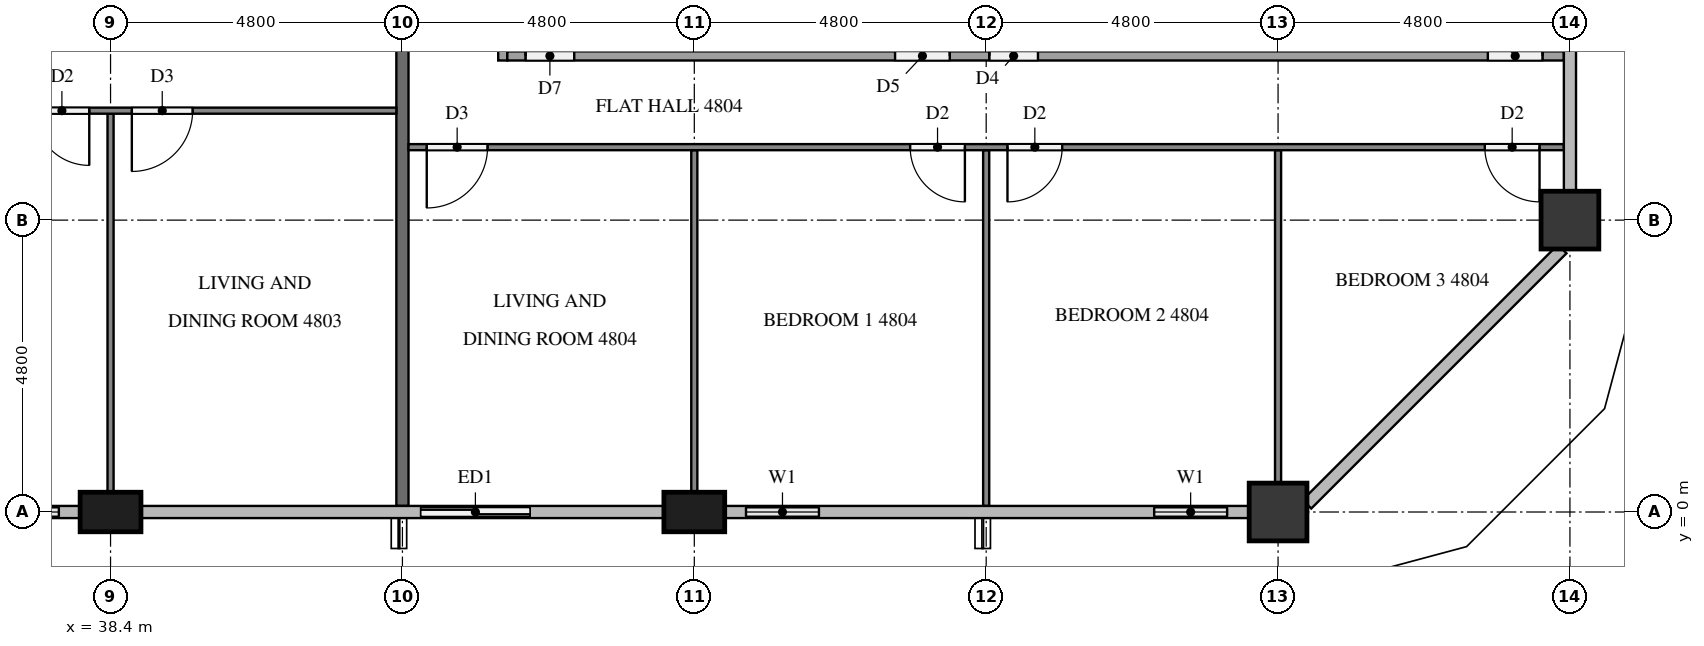
"""IFC4 building model, lengths in metres.
Left out: names, types, materials, properties, quantities, classifications, styles, units other than length and angle.
Written with IfcOpenShell. Run it as: python <this file> out.ifc"""

import sys

from ifc_helpers import new_model, si_unit, direction, frame, frame_2d, origin, origin_2d, place, context, subcontext, project, spatial, rectangle, extrude, element, fill, save


model = new_model("IFC4")
c1 = context("Model", 3, precision=1e-05, world=origin(), true_north=direction((0.0, 1.0)))
c2 = subcontext(c1, "Body", "Model", "MODEL_VIEW")
j1 = project(units=[si_unit("LENGTHUNIT", "METRE"), si_unit("PLANEANGLEUNIT", "RADIAN")], contexts=[c1])
p1 = place(None, origin())
s1 = spatial("IfcSite", under=j1, at=p1, CompositionType="ELEMENT")
p2 = place(p1, origin())
s2 = spatial("IfcBuilding", under=s1, at=p2, CompositionType="ELEMENT")
p3 = place(p2, frame((0.0, 0.0, 185.9)))
s3 = spatial("IfcBuildingStorey", under=s2, at=p3, CompositionType="ELEMENT", Elevation=185.9)
for number, where, z_axis, x_axis in (
    (1, (38.4, 0.0, 0.0), (0.0, 0.0, 1.0), (1.0, 0.0, 0.0)),
    (2, (48.0, 0.0, 0.0), (0.0, 0.0, 1.0), (1.0, 0.0, 0.0)),
):
    element("IfcColumn", number, at=place(p3, frame(where, z_axis=z_axis, x_axis=x_axis)), inside=s3, PredefinedType="COLUMN", context=c2, shape_type="SweptSolid", body=[
        extrude(rectangle(XDim=1.0, YDim=0.65, at=origin_2d()), origin(), (0.0, 0.0, 1.0), 3.2),
    ])
for number, where, z_axis, x_axis in (
    (3, (57.6, 0.0, 0.0), (0.0, 0.0, 1.0), (1.0, 0.0, 0.0)),
    (4, (62.4, 4.8, 0.0), (0.0, 0.0, 1.0), (1.0, 0.0, 0.0)),
):
    element("IfcColumn", number, at=place(p3, frame(where, z_axis=z_axis, x_axis=x_axis)), inside=s3, PredefinedType="COLUMN", context=c2, shape_type="SweptSolid", body=[
        extrude(rectangle(XDim=0.95, YDim=0.95, at=origin_2d()), origin(), (0.0, 0.0, 1.0), 3.2),
    ])
p4 = place(p3, frame((36.0, 0.0, 0.0), z_axis=(0.0, 0.0, 1.0), x_axis=(1.0, 0.0, 0.0)))
e5 = element("IfcWall", 5, at=p4, inside=s3, PredefinedType="SOLIDWALL", context=c2, shape_type="SweptSolid", body=[
    extrude(rectangle(XDim=1.9, YDim=0.15, at=frame_2d((0.95, 0.0))), origin(), (0.0, 0.0, 1.0), 3.2),
])
p5 = place(p4, frame((0.35, 0.0, 0.9)))
e6 = element("IfcOpeningElement", 6, at=p5, cuts=e5, PredefinedType="OPENING", context=c2, shape_type="SweptSolid", body=[
    extrude(rectangle(XDim=1.2, YDim=1.4, at=frame_2d((0.6, 0.7))), frame((0.0, 0.085, 0.0), z_axis=(0.0, -1.0, 0.0), x_axis=(1.0, 0.0, 0.0)), (0.0, 0.0, 1.0), 0.17),
])
p6 = place(p3, frame((43.2, 0.0, 0.0), z_axis=(0.0, 0.0, 1.0), x_axis=(1.0, 0.0, 0.0)))
e7 = element("IfcWall", 7, at=p6, inside=s3, PredefinedType="SOLIDWALL", context=c2, shape_type="SweptSolid", body=[
    extrude(rectangle(XDim=2.4, YDim=0.15, at=frame_2d((1.2, 0.0))), origin(), (0.0, 0.0, 1.0), 3.2),
])
p7 = place(p6, frame((0.3, 0.0, 0.0)))
e8 = element("IfcOpeningElement", 8, at=p7, cuts=e7, PredefinedType="OPENING", context=c2, shape_type="SweptSolid", body=[
    extrude(rectangle(XDim=1.8, YDim=2.4, at=frame_2d((0.9, 1.2))), frame((0.0, 0.085, 0.0), z_axis=(0.0, -1.0, 0.0), x_axis=(1.0, 0.0, 0.0)), (0.0, 0.0, 1.0), 0.17),
])
p8 = place(p3, frame((48.5, 0.0, 0.0), z_axis=(0.0, 0.0, 1.0), x_axis=(1.0, 0.0, 0.0)))
e9 = element("IfcWall", 9, at=p8, inside=s3, PredefinedType="SOLIDWALL", context=c2, shape_type="SweptSolid", body=[
    extrude(rectangle(XDim=1.9, YDim=0.15, at=frame_2d((0.95, 0.0))), origin(), (0.0, 0.0, 1.0), 3.2),
])
p9 = place(p8, frame((0.35, 0.0, 0.9)))
e10 = element("IfcOpeningElement", 10, at=p9, cuts=e9, PredefinedType="OPENING", context=c2, shape_type="SweptSolid", body=[
    extrude(rectangle(XDim=1.2, YDim=1.4, at=frame_2d((0.6, 0.7))), frame((0.0, 0.085, 0.0), z_axis=(0.0, -1.0, 0.0), x_axis=(1.0, 0.0, 0.0)), (0.0, 0.0, 1.0), 0.17),
])
p10 = place(p3, frame((55.2, 0.0, 0.0), z_axis=(0.0, 0.0, 1.0), x_axis=(1.0, 0.0, 0.0)))
e11 = element("IfcWall", 11, at=p10, inside=s3, PredefinedType="SOLIDWALL", context=c2, shape_type="SweptSolid", body=[
    extrude(rectangle(XDim=1.925, YDim=0.15, at=frame_2d((0.962, 0.0))), origin(), (0.0, 0.0, 1.0), 3.2),
])
p11 = place(p10, frame((0.363, 0.0, 0.9)))
e12 = element("IfcOpeningElement", 12, at=p11, cuts=e11, PredefinedType="OPENING", context=c2, shape_type="SweptSolid", body=[
    extrude(rectangle(XDim=1.2, YDim=1.4, at=frame_2d((0.6, 0.7))), frame((0.0, 0.085, 0.0), z_axis=(0.0, -1.0, 0.0), x_axis=(1.0, 0.0, 0.0)), (0.0, 0.0, 1.0), 0.17),
])
p12 = place(p3, frame((43.2, 11.9, 0.0), z_axis=(0.0, 0.0, 1.0), x_axis=(0.0, -1.0, 0.0)))
e13 = element("IfcWall", 13, at=p12, inside=s3, PredefinedType="PARTITIONING", context=c2, shape_type="SweptSolid", body=[
    extrude(rectangle(XDim=11.8, YDim=0.2, at=frame_2d((5.9, 0.0))), origin(), (0.0, 0.0, 1.0), 3.2),
])
p13 = place(p3, frame((38.4, 6.55, 0.0), z_axis=(0.0, 0.0, 1.0), x_axis=(0.0, -1.0, 0.0)))
e14 = element("IfcWall", 14, at=p13, inside=s3, PredefinedType="PARTITIONING", context=c2, shape_type="SweptSolid", body=[
    extrude(rectangle(XDim=6.225, YDim=0.1, at=frame_2d((3.113, 0.0))), origin(), (0.0, 0.0, 1.0), 3.2),
])
p14 = place(p3, frame((43.1, 6.6, 0.0), z_axis=(0.0, 0.0, 1.0), x_axis=(-1.0, 0.0, 0.0)))
e15 = element("IfcWall", 15, at=p14, inside=s3, PredefinedType="PARTITIONING", context=c2, shape_type="SweptSolid", body=[
    extrude(rectangle(XDim=9.4, YDim=0.1, at=frame_2d((4.7, 0.0))), origin(), (0.0, 0.0, 1.0), 3.2),
])
p15 = place(p14, frame((3.35, 0.0, 0.0)))
e16 = element("IfcOpeningElement", 16, at=p15, cuts=e15, PredefinedType="OPENING", context=c2, shape_type="SweptSolid", body=[
    extrude(rectangle(XDim=1.0, YDim=2.1, at=frame_2d((0.5, 1.05))), frame((0.0, 0.06, 0.0), z_axis=(0.0, -1.0, 0.0), x_axis=(1.0, 0.0, 0.0)), (0.0, 0.0, 1.0), 0.12),
])
p16 = place(p14, frame((5.05, 0.0, 0.0)))
e17 = element("IfcOpeningElement", 17, at=p16, cuts=e15, PredefinedType="OPENING", context=c2, shape_type="SweptSolid", body=[
    extrude(rectangle(XDim=0.9, YDim=2.1, at=frame_2d((0.45, 1.05))), frame((0.0, 0.06, 0.0), z_axis=(0.0, -1.0, 0.0), x_axis=(1.0, 0.0, 0.0)), (0.0, 0.0, 1.0), 0.12),
])
p17 = place(p3, frame((48.0, 5.95, 0.0), z_axis=(0.0, 0.0, 1.0), x_axis=(0.0, -1.0, 0.0)))
e18 = element("IfcWall", 18, at=p17, inside=s3, PredefinedType="PARTITIONING", context=c2, shape_type="SweptSolid", body=[
    extrude(rectangle(XDim=5.625, YDim=0.1, at=frame_2d((2.812, 0.0))), origin(), (0.0, 0.0, 1.0), 3.2),
])
p18 = place(p3, frame((52.8, 5.95, 0.0), z_axis=(0.0, 0.0, 1.0), x_axis=(0.0, -1.0, 0.0)))
e19 = element("IfcWall", 19, at=p18, inside=s3, PredefinedType="PARTITIONING", context=c2, shape_type="SweptSolid", body=[
    extrude(rectangle(XDim=5.85, YDim=0.1, at=frame_2d((2.925, 0.0))), origin(), (0.0, 0.0, 1.0), 3.2),
])
p19 = place(p3, frame((57.6, 5.95, 0.0), z_axis=(0.0, 0.0, 1.0), x_axis=(0.0, -1.0, 0.0)))
e20 = element("IfcWall", 20, at=p19, inside=s3, PredefinedType="PARTITIONING", context=c2, shape_type="SweptSolid", body=[
    extrude(rectangle(XDim=5.475, YDim=0.1, at=frame_2d((2.737, 0.0))), origin(), (0.0, 0.0, 1.0), 3.2),
])
p20 = place(p3, frame((62.3, 6.0, 0.0), z_axis=(0.0, 0.0, 1.0), x_axis=(-1.0, 0.0, 0.0)))
e21 = element("IfcWall", 21, at=p20, inside=s3, PredefinedType="PARTITIONING", context=c2, shape_type="SweptSolid", body=[
    extrude(rectangle(XDim=19.0, YDim=0.1, at=frame_2d((9.5, 0.0))), origin(), (0.0, 0.0, 1.0), 3.2),
])
p21 = place(p20, frame((17.7, 0.0, 0.0)))
e22 = element("IfcOpeningElement", 22, at=p21, cuts=e21, PredefinedType="OPENING", context=c2, shape_type="SweptSolid", body=[
    extrude(rectangle(XDim=1.0, YDim=2.1, at=frame_2d((0.5, 1.05))), frame((0.0, 0.06, 0.0), z_axis=(0.0, -1.0, 0.0), x_axis=(1.0, 0.0, 0.0)), (0.0, 0.0, 1.0), 0.12),
])
p22 = place(p20, frame((9.85, 0.0, 0.0)))
e23 = element("IfcOpeningElement", 23, at=p22, cuts=e21, PredefinedType="OPENING", context=c2, shape_type="SweptSolid", body=[
    extrude(rectangle(XDim=0.9, YDim=2.1, at=frame_2d((0.45, 1.05))), frame((0.0, 0.06, 0.0), z_axis=(0.0, -1.0, 0.0), x_axis=(1.0, 0.0, 0.0)), (0.0, 0.0, 1.0), 0.12),
])
p23 = place(p20, frame((8.25, 0.0, 0.0)))
e24 = element("IfcOpeningElement", 24, at=p23, cuts=e21, PredefinedType="OPENING", context=c2, shape_type="SweptSolid", body=[
    extrude(rectangle(XDim=0.9, YDim=2.1, at=frame_2d((0.45, 1.05))), frame((0.0, 0.06, 0.0), z_axis=(0.0, -1.0, 0.0), x_axis=(1.0, 0.0, 0.0)), (0.0, 0.0, 1.0), 0.12),
])
p24 = place(p20, frame((0.4, 0.0, 0.0)))
e25 = element("IfcOpeningElement", 25, at=p24, cuts=e21, PredefinedType="OPENING", context=c2, shape_type="SweptSolid", body=[
    extrude(rectangle(XDim=0.9, YDim=2.1, at=frame_2d((0.45, 1.05))), frame((0.0, 0.06, 0.0), z_axis=(0.0, -1.0, 0.0), x_axis=(1.0, 0.0, 0.0)), (0.0, 0.0, 1.0), 0.12),
])
p25 = place(p3, frame((44.85, 11.9, 0.0), z_axis=(0.0, 0.0, 1.0), x_axis=(0.0, -1.0, 0.0)))
e26 = element("IfcWall", 26, at=p25, inside=s3, PredefinedType="PARTITIONING", context=c2, shape_type="SweptSolid", body=[
    extrude(rectangle(XDim=4.475, YDim=0.15, at=frame_2d((2.237, 0.0))), origin(), (0.0, 0.0, 1.0), 3.2),
])
p26 = place(p3, frame((44.925, 7.5, 0.0), z_axis=(0.0, 0.0, 1.0), x_axis=(1.0, 0.0, 0.0)))
e27 = element("IfcWall", 27, at=p26, inside=s3, PredefinedType="PARTITIONING", context=c2, shape_type="SweptSolid", body=[
    extrude(rectangle(XDim=17.375, YDim=0.15, at=frame_2d((8.688, 0.0))), origin(), (0.0, 0.0, 1.0), 3.2),
])
p27 = place(p26, frame((0.3, 0.0, 0.0)))
e28 = element("IfcOpeningElement", 28, at=p27, cuts=e27, PredefinedType="OPENING", context=c2, shape_type="SweptSolid", body=[
    extrude(rectangle(XDim=0.8, YDim=2.1, at=frame_2d((0.4, 1.05))), frame((0.0, 0.085, 0.0), z_axis=(0.0, -1.0, 0.0), x_axis=(1.0, 0.0, 0.0)), (0.0, 0.0, 1.0), 0.17),
])
p28 = place(p26, frame((6.377, 0.0, 0.0)))
e29 = element("IfcOpeningElement", 29, at=p28, cuts=e27, PredefinedType="OPENING", context=c2, shape_type="SweptSolid", body=[
    extrude(rectangle(XDim=0.9, YDim=2.1, at=frame_2d((0.45, 1.05))), frame((0.0, 0.085, 0.0), z_axis=(0.0, -1.0, 0.0), x_axis=(1.0, 0.0, 0.0)), (0.0, 0.0, 1.0), 0.17),
])
p29 = place(p26, frame((7.927, 0.0, 0.0)))
e30 = element("IfcOpeningElement", 30, at=p29, cuts=e27, PredefinedType="OPENING", context=c2, shape_type="SweptSolid", body=[
    extrude(rectangle(XDim=0.8, YDim=2.1, at=frame_2d((0.4, 1.05))), frame((0.0, 0.085, 0.0), z_axis=(0.0, -1.0, 0.0), x_axis=(1.0, 0.0, 0.0)), (0.0, 0.0, 1.0), 0.17),
])
p30 = place(p26, frame((16.125, 0.0, 0.0)))
e31 = element("IfcOpeningElement", 31, at=p30, cuts=e27, PredefinedType="OPENING", context=c2, shape_type="SweptSolid", body=[
    extrude(rectangle(XDim=0.9, YDim=2.1, at=frame_2d((0.45, 1.05))), frame((0.0, 0.085, 0.0), z_axis=(0.0, -1.0, 0.0), x_axis=(1.0, 0.0, 0.0)), (0.0, 0.0, 1.0), 0.17),
])
p31 = place(p5, origin())
e32 = element("IfcWindow", 32, at=p31, inside=s3, PartitioningType="SINGLE_PANEL", PredefinedType="WINDOW", context=c2, shape_type="SweptSolid", body=[
    extrude(rectangle(XDim=1.2, YDim=1.4, at=frame_2d((0.6, 0.7))), frame((0.0, 0.03, 0.0), z_axis=(0.0, -1.0, 0.0), x_axis=(1.0, 0.0, 0.0)), (0.0, 0.0, 1.0), 0.06),
])
fill(e6, e32)
p32 = place(p7, origin())
e33 = element("IfcDoor", 33, at=p32, inside=s3, OperationType="SLIDING_TO_LEFT", PredefinedType="DOOR", context=c2, shape_type="SweptSolid", body=[
    extrude(rectangle(XDim=1.8, YDim=2.4, at=frame_2d((0.9, 1.2))), frame((0.0, 0.025, 0.0), z_axis=(0.0, -1.0, 0.0), x_axis=(1.0, 0.0, 0.0)), (0.0, 0.0, 1.0), 0.05),
])
fill(e8, e33)
p33 = place(p9, origin())
e34 = element("IfcWindow", 34, at=p33, inside=s3, PartitioningType="SINGLE_PANEL", PredefinedType="WINDOW", context=c2, shape_type="SweptSolid", body=[
    extrude(rectangle(XDim=1.2, YDim=1.4, at=frame_2d((0.6, 0.7))), frame((0.0, 0.03, 0.0), z_axis=(0.0, -1.0, 0.0), x_axis=(1.0, 0.0, 0.0)), (0.0, 0.0, 1.0), 0.06),
])
fill(e10, e34)
p34 = place(p11, origin())
e35 = element("IfcWindow", 35, at=p34, inside=s3, PartitioningType="SINGLE_PANEL", PredefinedType="WINDOW", context=c2, shape_type="SweptSolid", body=[
    extrude(rectangle(XDim=1.2, YDim=1.4, at=frame_2d((0.6, 0.7))), frame((0.0, 0.03, 0.0), z_axis=(0.0, -1.0, 0.0), x_axis=(1.0, 0.0, 0.0)), (0.0, 0.0, 1.0), 0.06),
])
fill(e12, e35)
p35 = place(p15, origin())
e36 = element("IfcDoor", 36, at=p35, inside=s3, OperationType="SINGLE_SWING_RIGHT", PredefinedType="DOOR", context=c2, shape_type="SweptSolid", body=[
    extrude(rectangle(XDim=1.0, YDim=2.1, at=frame_2d((0.5, 1.05))), frame((0.0, 0.025, 0.0), z_axis=(0.0, -1.0, 0.0), x_axis=(1.0, 0.0, 0.0)), (0.0, 0.0, 1.0), 0.05),
])
fill(e16, e36)
p36 = place(p16, origin())
e37 = element("IfcDoor", 37, at=p36, inside=s3, OperationType="SINGLE_SWING_LEFT", PredefinedType="DOOR", context=c2, shape_type="SweptSolid", body=[
    extrude(rectangle(XDim=0.9, YDim=2.1, at=frame_2d((0.45, 1.05))), frame((0.0, 0.025, 0.0), z_axis=(0.0, -1.0, 0.0), x_axis=(1.0, 0.0, 0.0)), (0.0, 0.0, 1.0), 0.05),
])
fill(e17, e37)
p37 = place(p21, origin())
e38 = element("IfcDoor", 38, at=p37, inside=s3, OperationType="SINGLE_SWING_RIGHT", PredefinedType="DOOR", context=c2, shape_type="SweptSolid", body=[
    extrude(rectangle(XDim=1.0, YDim=2.1, at=frame_2d((0.5, 1.05))), frame((0.0, 0.025, 0.0), z_axis=(0.0, -1.0, 0.0), x_axis=(1.0, 0.0, 0.0)), (0.0, 0.0, 1.0), 0.05),
])
fill(e22, e38)
p38 = place(p22, origin())
e39 = element("IfcDoor", 39, at=p38, inside=s3, OperationType="SINGLE_SWING_LEFT", PredefinedType="DOOR", context=c2, shape_type="SweptSolid", body=[
    extrude(rectangle(XDim=0.9, YDim=2.1, at=frame_2d((0.45, 1.05))), frame((0.0, 0.025, 0.0), z_axis=(0.0, -1.0, 0.0), x_axis=(1.0, 0.0, 0.0)), (0.0, 0.0, 1.0), 0.05),
])
fill(e23, e39)
p39 = place(p23, origin())
e40 = element("IfcDoor", 40, at=p39, inside=s3, OperationType="SINGLE_SWING_RIGHT", PredefinedType="DOOR", context=c2, shape_type="SweptSolid", body=[
    extrude(rectangle(XDim=0.9, YDim=2.1, at=frame_2d((0.45, 1.05))), frame((0.0, 0.025, 0.0), z_axis=(0.0, -1.0, 0.0), x_axis=(1.0, 0.0, 0.0)), (0.0, 0.0, 1.0), 0.05),
])
fill(e24, e40)
p40 = place(p24, origin())
e41 = element("IfcDoor", 41, at=p40, inside=s3, OperationType="SINGLE_SWING_LEFT", PredefinedType="DOOR", context=c2, shape_type="SweptSolid", body=[
    extrude(rectangle(XDim=0.9, YDim=2.1, at=frame_2d((0.45, 1.05))), frame((0.0, 0.025, 0.0), z_axis=(0.0, -1.0, 0.0), x_axis=(1.0, 0.0, 0.0)), (0.0, 0.0, 1.0), 0.05),
])
fill(e25, e41)
p41 = place(p27, origin())
e42 = element("IfcDoor", 42, at=p41, inside=s3, OperationType="SINGLE_SWING_LEFT", PredefinedType="DOOR", context=c2, shape_type="SweptSolid", body=[
    extrude(rectangle(XDim=0.8, YDim=2.1, at=frame_2d((0.4, 1.05))), frame((0.0, 0.025, 0.0), z_axis=(0.0, -1.0, 0.0), x_axis=(1.0, 0.0, 0.0)), (0.0, 0.0, 1.0), 0.05),
])
fill(e28, e42)
p42 = place(p28, origin())
e43 = element("IfcDoor", 43, at=p42, inside=s3, OperationType="SINGLE_SWING_RIGHT", PredefinedType="DOOR", context=c2, shape_type="SweptSolid", body=[
    extrude(rectangle(XDim=0.9, YDim=2.1, at=frame_2d((0.45, 1.05))), frame((0.0, 0.025, 0.0), z_axis=(0.0, -1.0, 0.0), x_axis=(1.0, 0.0, 0.0)), (0.0, 0.0, 1.0), 0.05),
])
fill(e29, e43)
p43 = place(p29, origin())
e44 = element("IfcDoor", 44, at=p43, inside=s3, OperationType="SINGLE_SWING_LEFT", PredefinedType="DOOR", context=c2, shape_type="SweptSolid", body=[
    extrude(rectangle(XDim=0.8, YDim=2.1, at=frame_2d((0.4, 1.05))), frame((0.0, 0.025, 0.0), z_axis=(0.0, -1.0, 0.0), x_axis=(1.0, 0.0, 0.0)), (0.0, 0.0, 1.0), 0.05),
])
fill(e30, e44)
p44 = place(p30, origin())
e45 = element("IfcDoor", 45, at=p44, inside=s3, OperationType="SINGLE_SWING_RIGHT", PredefinedType="DOOR", context=c2, shape_type="SweptSolid", body=[
    extrude(rectangle(XDim=0.9, YDim=2.1, at=frame_2d((0.45, 1.05))), frame((0.0, 0.025, 0.0), z_axis=(0.0, -1.0, 0.0), x_axis=(1.0, 0.0, 0.0)), (0.0, 0.0, 1.0), 0.05),
])
fill(e31, e45)
save(model, sys.argv[1])
